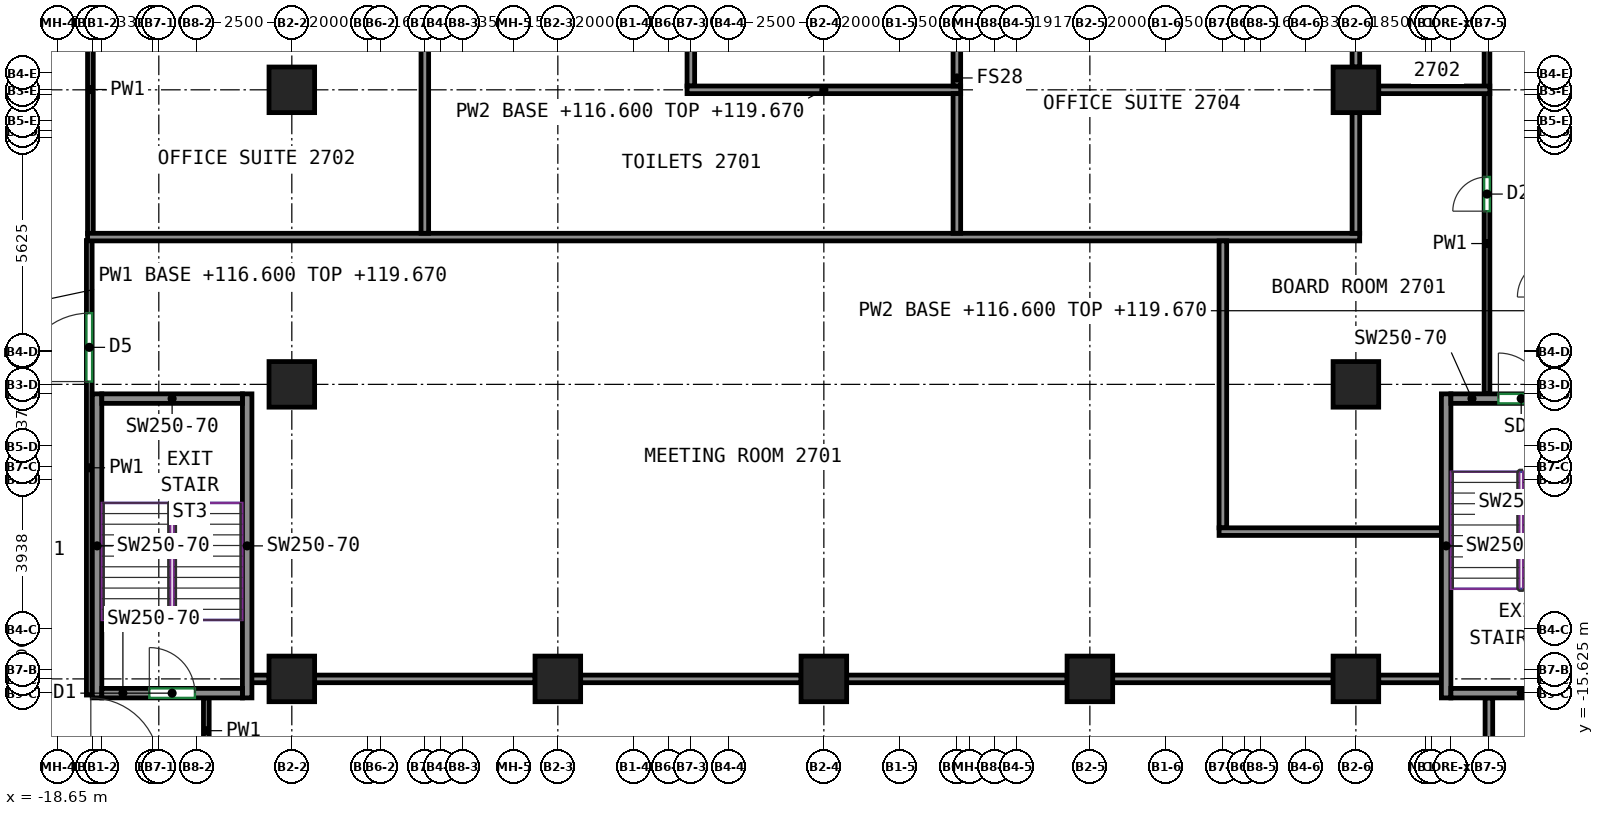
"""IFC4 building model, lengths in metres.
Left out: names, types, materials, properties, quantities, classifications, styles, units other than length and angle.
Written with IfcOpenShell. Run it as: python <this file> out.ifc"""

import sys

from ifc_helpers import new_model, si_unit, direction, frame, frame_2d, origin, origin_2d, place, context, subcontext, project, spatial, rectangle, extrude, source, transform, mapped, element, fill, save


model = new_model("IFC4")
c1 = context("Model", 3, precision=1e-05, world=origin(), true_north=direction((0.0, 1.0)))
c2 = subcontext(c1, "Body", "Model", "MODEL_VIEW")
j1 = project(units=[si_unit("LENGTHUNIT", "METRE"), si_unit("PLANEANGLEUNIT", "RADIAN")], contexts=[c1])
p1 = place(None, origin())
s1 = spatial("IfcSite", under=j1, at=p1, CompositionType="ELEMENT")
p2 = place(p1, origin())
s2 = spatial("IfcBuilding", under=s1, at=p2, CompositionType="ELEMENT")
p3 = place(p2, frame((0.0, 0.0, 116.6)))
s3 = spatial("IfcBuildingStorey", under=s2, at=p3, CompositionType="ELEMENT", Elevation=116.6)
m1 = source(origin(), c2, "Body", "SweptSolid", [
    extrude(rectangle(XDim=1.2, YDim=1.2, at=origin_2d()), origin(), (0.0, 0.0, 1.0), 3.72),
])
for number, where, z_axis, x_axis in (
    (1, (-12.5, -15.25, 0.0), (0.0, 0.0, 1.0), (1.0, 0.0, 0.0)),
    (2, (-12.5, -7.5, 0.0), (0.0, 0.0, 1.0), (1.0, 0.0, 0.0)),
    (3, (-12.5, 0.25, 0.0), (0.0, 0.0, 1.0), (1.0, 0.0, 0.0)),
    (4, (-5.5, -15.25, 0.0), (0.0, 0.0, 1.0), (1.0, 0.0, 0.0)),
    (5, (1.5, -15.25, 0.0), (0.0, 0.0, 1.0), (1.0, 0.0, 0.0)),
    (6, (8.5, -15.25, 0.0), (0.0, 0.0, 1.0), (1.0, 0.0, 0.0)),
    (7, (15.5, -15.25, 0.0), (0.0, 0.0, 1.0), (1.0, 0.0, 0.0)),
    (8, (15.5, -7.5, 0.0), (0.0, 0.0, 1.0), (1.0, 0.0, 0.0)),
    (9, (15.5, 0.25, 0.0), (0.0, 0.0, 1.0), (1.0, 0.0, 0.0)),
):
    element("IfcColumn", number, at=place(p3, frame(where, z_axis=z_axis, x_axis=x_axis)), inside=s3, PredefinedType="COLUMN", context=c2, shape_type="MappedRepresentation", body=[
        mapped(m1, transform((0.0, 0.0, 0.0))),
    ])
m2 = source(origin(), c2, "Body", "SweptSolid", [
    extrude(rectangle(XDim=8.0, YDim=0.25, at=frame_2d((4.0, 0.0))), origin(), (0.0, 0.0, 1.0), 3.72),
])
for number, where, z_axis, x_axis in (
    (10, (-17.625, -15.75, 0.0), (0.0, 0.0, 1.0), (0.0, 1.0, 0.0)),
    (11, (-13.675, -15.75, 0.0), (0.0, 0.0, 1.0), (0.0, 1.0, 0.0)),
):
    element("IfcWall", number, at=place(p3, frame(where, z_axis=z_axis, x_axis=x_axis)), inside=s3, PredefinedType="SHEAR", context=c2, shape_type="MappedRepresentation", body=[
        mapped(m2, transform((0.0, 0.0, 0.0))),
    ])
m3 = source(origin(), c2, "Body", "SweptSolid", [
    extrude(rectangle(XDim=3.7, YDim=0.25, at=frame_2d((1.85, 0.0))), origin(), (0.0, 0.0, 1.0), 3.72),
])
p4 = place(p3, frame((-17.5, -15.625, 0.0), z_axis=(0.0, 0.0, 1.0), x_axis=(1.0, 0.0, 0.0)))
e12 = element("IfcWall", 12, at=p4, inside=s3, PredefinedType="SHEAR", context=c2, shape_type="MappedRepresentation", body=[
    mapped(m3, transform((0.0, 0.0, 0.0))),
])
p5 = place(p4, frame((1.25, 0.0, 0.0)))
e13 = element("IfcOpeningElement", 13, at=p5, cuts=e12, PredefinedType="OPENING", context=c2, shape_type="SweptSolid", body=[
    extrude(rectangle(XDim=1.2, YDim=2.1, at=frame_2d((0.6, 1.05))), frame((0.0, 0.135, 0.0), z_axis=(0.0, -1.0, 0.0), x_axis=(1.0, 0.0, 0.0)), (0.0, 0.0, 1.0), 0.27),
])
p6 = place(p3, frame((-17.5, -7.875, 0.0), z_axis=(0.0, 0.0, 1.0), x_axis=(1.0, 0.0, 0.0)))
e14 = element("IfcWall", 14, at=p6, inside=s3, PredefinedType="SHEAR", context=c2, shape_type="MappedRepresentation", body=[
    mapped(m3, transform((0.0, 0.0, 0.0))),
])
p7 = place(p3, frame((17.875, -15.75, 0.0), z_axis=(0.0, 0.0, 1.0), x_axis=(0.0, 1.0, 0.0)))
e15 = element("IfcWall", 15, at=p7, inside=s3, PredefinedType="SHEAR", context=c2, shape_type="MappedRepresentation", body=[
    mapped(m2, transform((0.0, 0.0, 0.0))),
])
p8 = place(p3, frame((18.0, -15.625, 0.0), z_axis=(0.0, 0.0, 1.0), x_axis=(1.0, 0.0, 0.0)))
e16 = element("IfcWall", 16, at=p8, inside=s3, PredefinedType="SHEAR", context=c2, shape_type="MappedRepresentation", body=[
    mapped(m3, transform((0.0, 0.0, 0.0))),
])
p9 = place(p3, frame((18.0, -7.875, 0.0), z_axis=(0.0, 0.0, 1.0), x_axis=(1.0, 0.0, 0.0)))
e17 = element("IfcWall", 17, at=p9, inside=s3, PredefinedType="SHEAR", context=c2, shape_type="MappedRepresentation", body=[
    mapped(m3, transform((0.0, 0.0, 0.0))),
])
p10 = place(p9, frame((1.25, 0.0, 0.0)))
e18 = element("IfcOpeningElement", 18, at=p10, cuts=e17, PredefinedType="OPENING", context=c2, shape_type="SweptSolid", body=[
    extrude(rectangle(XDim=1.2, YDim=2.1, at=frame_2d((0.6, 1.05))), frame((0.0, 0.135, 0.0), z_axis=(0.0, -1.0, 0.0), x_axis=(1.0, 0.0, 0.0)), (0.0, 0.0, 1.0), 0.27),
])
p11 = place(p3, frame((-17.8, -3.535, 0.0), z_axis=(0.0, 0.0, 1.0), x_axis=(0.0, 1.0, 0.0)))
e19 = element("IfcWall", 19, at=p11, inside=s3, PredefinedType="PARTITIONING", context=c2, shape_type="SweptSolid", body=[
    extrude(rectangle(XDim=7.585, YDim=0.15, at=frame_2d((3.792, 0.0))), origin(), (0.0, 0.0, 1.0), 3.72),
])
p12 = place(p11, frame((5.067, 0.0, 0.0)))
e20 = element("IfcOpeningElement", 20, at=p12, cuts=e19, PredefinedType="OPENING", context=c2, shape_type="SweptSolid", body=[
    extrude(rectangle(XDim=1.0, YDim=2.1, at=frame_2d((0.5, 1.05))), frame((0.0, 0.085, 0.0), z_axis=(0.0, -1.0, 0.0), x_axis=(1.0, 0.0, 0.0)), (0.0, 0.0, 1.0), 0.17),
])
p13 = place(p3, frame((-17.83, -15.675, 0.0), z_axis=(0.0, 0.0, 1.0), x_axis=(0.0, 1.0, 0.0)))
e21 = element("IfcWall", 21, at=p13, inside=s3, PredefinedType="PARTITIONING", context=c2, shape_type="SweptSolid", body=[
    extrude(rectangle(XDim=11.96, YDim=0.15, at=frame_2d((5.98, 0.0))), origin(), (0.0, 0.0, 1.0), 3.72),
])
p14 = place(p13, frame((8.249, 0.0, 0.0)))
e22 = element("IfcOpeningElement", 22, at=p14, cuts=e21, PredefinedType="OPENING", context=c2, shape_type="SweptSolid", body=[
    extrude(rectangle(XDim=1.8, YDim=2.1, at=frame_2d((0.9, 1.05))), frame((0.0, 0.085, 0.0), z_axis=(0.0, -1.0, 0.0), x_axis=(1.0, 0.0, 0.0)), (0.0, 0.0, 1.0), 0.17),
])
p15 = place(p3, frame((-14.75, -17.475, 0.0), z_axis=(0.0, 0.0, 1.0), x_axis=(0.0, 1.0, 0.0)))
e23 = element("IfcWall", 23, at=p15, inside=s3, PredefinedType="PARTITIONING", context=c2, shape_type="SweptSolid", body=[
    extrude(rectangle(XDim=1.725, YDim=0.15, at=frame_2d((0.863, 0.0))), origin(), (0.0, 0.0, 1.0), 3.72),
])
p16 = place(p3, frame((18.95, -7.75, 0.0), z_axis=(0.0, 0.0, 1.0), x_axis=(0.0, 1.0, 0.0)))
e24 = element("IfcWall", 24, at=p16, inside=s3, PredefinedType="PARTITIONING", context=c2, shape_type="SweptSolid", body=[
    extrude(rectangle(XDim=7.91, YDim=0.15, at=frame_2d((3.955, 0.0))), origin(), (0.0, 0.0, 1.0), 3.72),
])
p17 = place(p16, frame((4.807, 0.0, 0.0)))
e25 = element("IfcOpeningElement", 25, at=p17, cuts=e24, PredefinedType="OPENING", context=c2, shape_type="SweptSolid", body=[
    extrude(rectangle(XDim=0.9, YDim=2.1, at=frame_2d((0.45, 1.05))), frame((0.0, 0.085, 0.0), z_axis=(0.0, -1.0, 0.0), x_axis=(1.0, 0.0, 0.0)), (0.0, 0.0, 1.0), 0.17),
])
p18 = place(p3, frame((18.95, 0.34, 0.0), z_axis=(0.0, 0.0, 1.0), x_axis=(0.0, 1.0, 0.0)))
e26 = element("IfcWall", 26, at=p18, inside=s3, PredefinedType="PARTITIONING", context=c2, shape_type="SweptSolid", body=[
    extrude(rectangle(XDim=2.908, YDim=0.15, at=frame_2d((1.454, 0.0))), origin(), (0.0, 0.0, 1.0), 3.72),
])
p19 = place(p3, frame((-17.874, -3.625, 0.0), z_axis=(0.0, 0.0, 1.0), x_axis=(1.0, 0.0, 0.0)))
e27 = element("IfcWall", 27, at=p19, inside=s3, PredefinedType="PARTITIONING", context=c2, shape_type="SweptSolid", body=[
    extrude(rectangle(XDim=33.474, YDim=0.2, at=frame_2d((16.737, 0.0))), origin(), (0.0, 0.0, 1.0), 3.72),
])
p20 = place(p3, frame((-9.0, -3.525, 0.0), z_axis=(0.0, 0.0, 1.0), x_axis=(0.0, 1.0, 0.0)))
e28 = element("IfcWall", 28, at=p20, inside=s3, PredefinedType="PARTITIONING", context=c2, shape_type="SweptSolid", body=[
    extrude(rectangle(XDim=6.399, YDim=0.2, at=frame_2d((3.199, 0.0))), origin(), (0.0, 0.0, 1.0), 3.72),
])
p21 = place(p3, frame((16.1, -15.25, 0.0), z_axis=(0.0, 0.0, 1.0), x_axis=(1.0, 0.0, 0.0)))
e29 = element("IfcWall", 29, at=p21, inside=s3, PredefinedType="PARTITIONING", context=c2, shape_type="SweptSolid", body=[
    extrude(rectangle(XDim=1.65, YDim=0.2, at=frame_2d((0.825, 0.0))), origin(), (0.0, 0.0, 1.0), 3.72),
])
for number, where, z_axis, x_axis in (
    (30, (9.1, -15.25, 0.0), (0.0, 0.0, 1.0), (1.0, 0.0, 0.0)),
    (31, (2.1, -15.25, 0.0), (0.0, 0.0, 1.0), (1.0, 0.0, 0.0)),
    (32, (-4.9, -15.25, 0.0), (0.0, 0.0, 1.0), (1.0, 0.0, 0.0)),
    (33, (-11.9, -15.25, 0.0), (0.0, 0.0, 1.0), (1.0, 0.0, 0.0)),
):
    element("IfcWall", number, at=place(p3, frame(where, z_axis=z_axis, x_axis=x_axis)), inside=s3, PredefinedType="PARTITIONING", context=c2, shape_type="SweptSolid", body=[
        extrude(rectangle(XDim=5.8, YDim=0.2, at=frame_2d((2.9, 0.0))), origin(), (0.0, 0.0, 1.0), 3.72),
    ])
p22 = place(p3, frame((-13.6, -15.25, 0.0), z_axis=(0.0, 0.0, 1.0), x_axis=(1.0, 0.0, 0.0)))
e34 = element("IfcWall", 34, at=p22, inside=s3, PredefinedType="PARTITIONING", context=c2, shape_type="SweptSolid", body=[
    extrude(rectangle(XDim=0.5, YDim=0.2, at=frame_2d((0.25, 0.0))), origin(), (0.0, 0.0, 1.0), 3.72),
])
p23 = place(p3, frame((12.0, -11.275, 0.0), z_axis=(0.0, 0.0, 1.0), x_axis=(0.0, 1.0, 0.0)))
e35 = element("IfcWall", 35, at=p23, inside=s3, PredefinedType="PARTITIONING", context=c2, shape_type="SweptSolid", body=[
    extrude(rectangle(XDim=7.55, YDim=0.2, at=frame_2d((3.775, 0.0))), origin(), (0.0, 0.0, 1.0), 3.72),
])
p24 = place(p3, frame((11.9, -11.375, 0.0), z_axis=(0.0, 0.0, 1.0), x_axis=(1.0, 0.0, 0.0)))
e36 = element("IfcWall", 36, at=p24, inside=s3, PredefinedType="PARTITIONING", context=c2, shape_type="SweptSolid", body=[
    extrude(rectangle(XDim=5.85, YDim=0.2, at=frame_2d((2.925, 0.0))), origin(), (0.0, 0.0, 1.0), 3.72),
])
p25 = place(p3, frame((19.0, -22.75, 0.0), z_axis=(0.0, 0.0, 1.0), x_axis=(0.0, 1.0, 0.0)))
e37 = element("IfcWall", 37, at=p25, inside=s3, PredefinedType="PARTITIONING", context=c2, shape_type="SweptSolid", body=[
    extrude(rectangle(XDim=7.0, YDim=0.2, at=frame_2d((3.5, 0.0))), origin(), (0.0, 0.0, 1.0), 3.72),
])
p26 = place(p3, frame((-2.0, 0.35, 0.0), z_axis=(0.0, 0.0, 1.0), x_axis=(0.0, 1.0, 0.0)))
e38 = element("IfcWall", 38, at=p26, inside=s3, PredefinedType="PARTITIONING", context=c2, shape_type="SweptSolid", body=[
    extrude(rectangle(XDim=2.524, YDim=0.2, at=frame_2d((1.262, 0.0))), origin(), (0.0, 0.0, 1.0), 3.72),
])
p27 = place(p3, frame((-2.1, 0.25, 0.0), z_axis=(0.0, 0.0, 1.0), x_axis=(1.0, 0.0, 0.0)))
e39 = element("IfcWall", 39, at=p27, inside=s3, PredefinedType="PARTITIONING", context=c2, shape_type="SweptSolid", body=[
    extrude(rectangle(XDim=7.2, YDim=0.2, at=frame_2d((3.6, 0.0))), origin(), (0.0, 0.0, 1.0), 3.07),
])
p28 = place(p3, frame((5.0, -3.525, 0.0), z_axis=(0.0, 0.0, 1.0), x_axis=(0.0, 1.0, 0.0)))
e40 = element("IfcWall", 40, at=p28, inside=s3, PredefinedType="PARTITIONING", context=c2, shape_type="SweptSolid", body=[
    extrude(rectangle(XDim=3.675, YDim=0.2, at=frame_2d((1.837, 0.0))), origin(), (0.0, 0.0, 1.0), 3.72),
])
p29 = place(p3, frame((5.0, 0.35, 0.0), z_axis=(0.0, 0.0, 1.0), x_axis=(0.0, 1.0, 0.0)))
e41 = element("IfcWall", 41, at=p29, inside=s3, PredefinedType="PARTITIONING", context=c2, shape_type="SweptSolid", body=[
    extrude(rectangle(XDim=3.699, YDim=0.2, at=frame_2d((1.85, 0.0))), origin(), (0.0, 0.0, 1.0), 3.72),
])
p30 = place(p3, frame((15.5, -3.525, 0.0), z_axis=(0.0, 0.0, 1.0), x_axis=(0.0, 1.0, 0.0)))
e42 = element("IfcWall", 42, at=p30, inside=s3, PredefinedType="PARTITIONING", context=c2, shape_type="SweptSolid", body=[
    extrude(rectangle(XDim=3.175, YDim=0.2, at=frame_2d((1.587, 0.0))), origin(), (0.0, 0.0, 1.0), 3.72),
])
p31 = place(p3, frame((15.5, 0.85, 0.0), z_axis=(0.0, 0.0, 1.0), x_axis=(0.0, 1.0, 0.0)))
e43 = element("IfcWall", 43, at=p31, inside=s3, PredefinedType="PARTITIONING", context=c2, shape_type="SweptSolid", body=[
    extrude(rectangle(XDim=2.024, YDim=0.2, at=frame_2d((1.012, 0.0))), origin(), (0.0, 0.0, 1.0), 3.72),
])
p32 = place(p3, frame((16.1, 0.25, 0.0), z_axis=(0.0, 0.0, 1.0), x_axis=(1.0, 0.0, 0.0)))
e44 = element("IfcWall", 44, at=p32, inside=s3, PredefinedType="PARTITIONING", context=c2, shape_type="SweptSolid", body=[
    extrude(rectangle(XDim=2.924, YDim=0.2, at=frame_2d((1.462, 0.0))), origin(), (0.0, 0.0, 1.0), 3.72),
])
p33 = place(p5, origin())
e45 = element("IfcDoor", 45, at=p33, inside=s3, OperationType="DOUBLE_DOOR_SINGLE_SWING", PredefinedType="DOOR", context=c2, shape_type="SweptSolid", body=[
    extrude(rectangle(XDim=1.2, YDim=2.1, at=frame_2d((0.6, 1.05))), frame((0.0, 0.025, 0.0), z_axis=(0.0, -1.0, 0.0), x_axis=(1.0, 0.0, 0.0)), (0.0, 0.0, 1.0), 0.05),
])
fill(e13, e45)
p34 = place(p10, origin())
e46 = element("IfcDoor", 46, at=p34, inside=s3, OperationType="DOUBLE_DOOR_SINGLE_SWING", PredefinedType="DOOR", context=c2, shape_type="SweptSolid", body=[
    extrude(rectangle(XDim=1.2, YDim=2.1, at=frame_2d((0.6, 1.05))), frame((0.0, 0.025, 0.0), z_axis=(0.0, -1.0, 0.0), x_axis=(1.0, 0.0, 0.0)), (0.0, 0.0, 1.0), 0.05),
])
fill(e18, e46)
p35 = place(p14, origin())
e47 = element("IfcDoor", 47, at=p35, inside=s3, OperationType="DOUBLE_DOOR_SINGLE_SWING", PredefinedType="DOOR", context=c2, shape_type="SweptSolid", body=[
    extrude(rectangle(XDim=1.8, YDim=2.1, at=frame_2d((0.9, 1.05))), frame((0.0, 0.025, 0.0), z_axis=(0.0, -1.0, 0.0), x_axis=(1.0, 0.0, 0.0)), (0.0, 0.0, 1.0), 0.05),
])
fill(e22, e47)
p36 = place(p17, origin())
e48 = element("IfcDoor", 48, at=p36, inside=s3, OperationType="SINGLE_SWING_LEFT", PredefinedType="DOOR", context=c2, shape_type="SweptSolid", body=[
    extrude(rectangle(XDim=0.9, YDim=2.1, at=frame_2d((0.45, 1.05))), frame((0.0, 0.025, 0.0), z_axis=(0.0, -1.0, 0.0), x_axis=(1.0, 0.0, 0.0)), (0.0, 0.0, 1.0), 0.05),
])
fill(e25, e48)
save(model, sys.argv[1])
